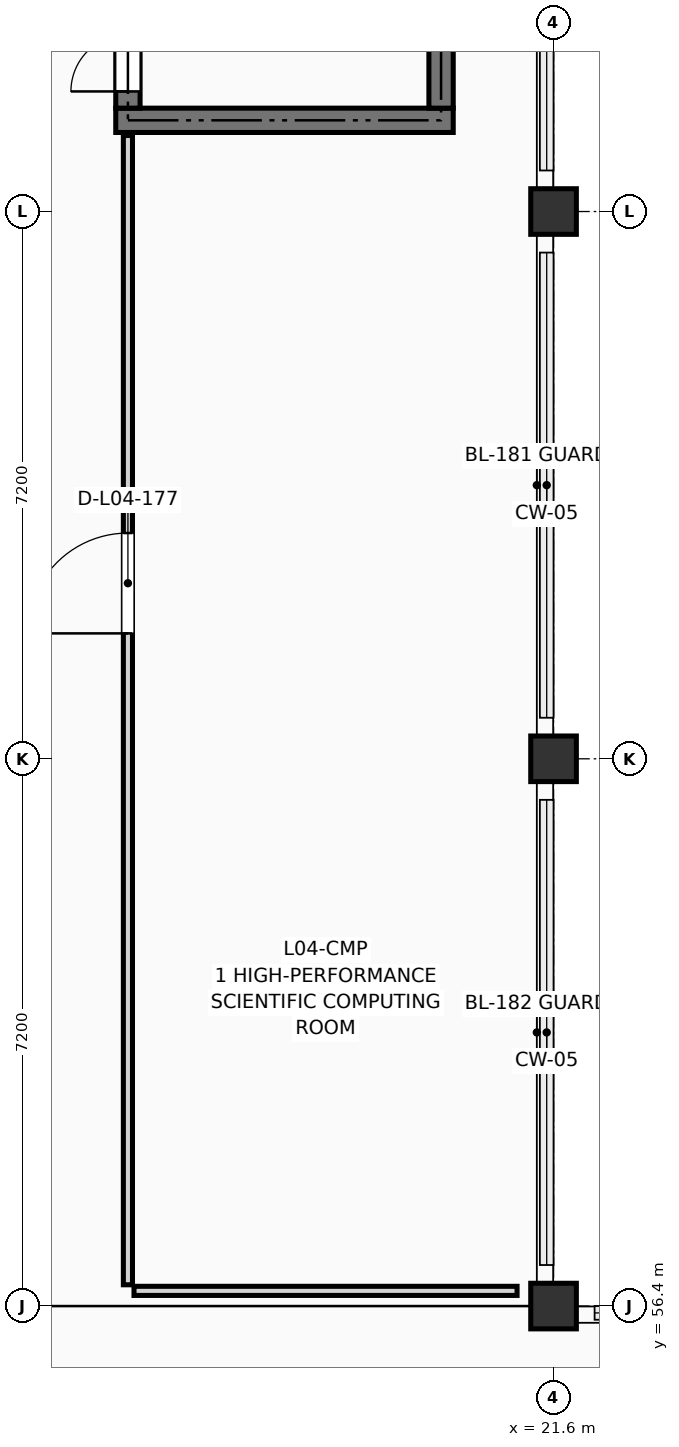
"""IFC4 building model, lengths in metres.
Left out: names, types, materials, properties, quantities, classifications, styles, units other than length and angle.
Written with IfcOpenShell. Run it as: python <this file> out.ifc"""

import sys

from ifc_helpers import new_model, si_unit, direction, frame, frame_2d, origin, origin_2d, place, context, subcontext, project, spatial, rectangle, extrude, element, fill, save


model = new_model("IFC4")
c1 = context("Model", 3, precision=1e-05, world=origin(), true_north=direction((0.0, 1.0)))
c2 = subcontext(c1, "Body", "Model", "MODEL_VIEW")
j1 = project(units=[si_unit("LENGTHUNIT", "METRE"), si_unit("PLANEANGLEUNIT", "RADIAN")], contexts=[c1])
p1 = place(None, origin())
s1 = spatial("IfcSite", under=j1, at=p1, CompositionType="ELEMENT")
p2 = place(p1, origin())
s2 = spatial("IfcBuilding", under=s1, at=p2, CompositionType="ELEMENT")
p3 = place(p2, frame((0.0, 0.0, 15.75)))
s3 = spatial("IfcBuildingStorey", under=s2, at=p3, CompositionType="ELEMENT", Elevation=15.75)
for number, where, z_axis, x_axis in (
    (1, (21.6, 56.4, 0.0), (0.0, 0.0, 1.0), (1.0, 0.0, 0.0)),
    (2, (21.6, 63.6, 0.0), (0.0, 0.0, 1.0), (1.0, 0.0, 0.0)),
    (3, (21.6, 70.8, 0.0), (0.0, 0.0, 1.0), (1.0, 0.0, 0.0)),
):
    element("IfcColumn", number, at=place(p3, frame(where, z_axis=z_axis, x_axis=x_axis)), inside=s3, PredefinedType="COLUMN", context=c2, shape_type="SweptSolid", body=[
        extrude(rectangle(XDim=0.6, YDim=0.6, at=origin_2d()), origin(), (0.0, 0.0, 1.0), 3.6),
    ])
p4 = place(p3, frame((15.84, 72.0, 0.0), z_axis=(0.0, 0.0, 1.0), x_axis=(1.0, 0.0, 0.0)))
e4 = element("IfcWall", 4, at=p4, inside=s3, PredefinedType="SHEAR", context=c2, shape_type="SweptSolid", body=[
    extrude(rectangle(XDim=4.44, YDim=0.32, at=frame_2d((2.22, 0.0))), origin(), (0.0, 0.0, 1.0), 3.39),
])
p5 = place(p3, frame((16.0, 72.16, 0.0), z_axis=(0.0, 0.0, 1.0), x_axis=(0.0, 1.0, 0.0)))
e5 = element("IfcWall", 5, at=p5, inside=s3, PredefinedType="SHEAR", context=c2, shape_type="SweptSolid", body=[
    extrude(rectangle(XDim=7.28, YDim=0.32, at=frame_2d((3.64, 0.0))), origin(), (0.0, 0.0, 1.0), 3.39),
])
p6 = place(p5, frame((0.22, 0.0, 0.0)))
e6 = element("IfcOpeningElement", 6, at=p6, cuts=e5, PredefinedType="OPENING", context=c2, shape_type="SweptSolid", body=[
    extrude(rectangle(XDim=1.5, YDim=2.2, at=frame_2d((0.75, 1.1))), frame((0.0, 0.172, 0.0), z_axis=(0.0, -1.0, 0.0), x_axis=(1.0, 0.0, 0.0)), (0.0, 0.0, 1.0), 0.344),
])
p7 = place(p3, frame((20.12, 72.16, 0.0), z_axis=(0.0, 0.0, 1.0), x_axis=(0.0, 1.0, 0.0)))
e7 = element("IfcWall", 7, at=p7, inside=s3, PredefinedType="SHEAR", context=c2, shape_type="SweptSolid", body=[
    extrude(rectangle(XDim=7.28, YDim=0.32, at=frame_2d((3.64, 0.0))), origin(), (0.0, 0.0, 1.0), 3.39),
])
p8 = place(p3, frame((16.0, 56.68, 0.0), z_axis=(0.0, 0.0, 1.0), x_axis=(0.0, 1.0, 0.0)))
e8 = element("IfcWall", 8, at=p8, inside=s3, PredefinedType="PARTITIONING", context=c2, shape_type="SweptSolid", body=[
    extrude(rectangle(XDim=15.12, YDim=0.12, at=frame_2d((7.56, 0.0))), origin(), (0.0, 0.0, 1.0), 3.375),
])
p9 = place(p8, frame((8.57, 0.0, 0.0)))
e9 = element("IfcOpeningElement", 9, at=p9, cuts=e8, PredefinedType="OPENING", context=c2, shape_type="SweptSolid", body=[
    extrude(rectangle(XDim=1.32, YDim=2.2, at=frame_2d((0.66, 1.1))), frame((0.0, 0.072, 0.0), z_axis=(0.0, -1.0, 0.0), x_axis=(1.0, 0.0, 0.0)), (0.0, 0.0, 1.0), 0.144),
])
p10 = place(p3, frame((16.08, 56.6, 0.0), z_axis=(0.0, 0.0, 1.0), x_axis=(1.0, 0.0, 0.0)))
e10 = element("IfcWall", 10, at=p10, inside=s3, PredefinedType="PARTITIONING", context=c2, shape_type="SweptSolid", body=[
    extrude(rectangle(XDim=5.04, YDim=0.12, at=frame_2d((2.52, 0.0))), origin(), (0.0, 0.0, 1.0), 2.691),
])
p11 = place(p6, origin())
e11 = element("IfcDoor", 11, at=p11, inside=s3, OperationType="DOUBLE_DOOR_SINGLE_SWING", PredefinedType="DOOR", context=c2, shape_type="SweptSolid", body=[
    extrude(rectangle(XDim=1.5, YDim=2.2, at=frame_2d((0.75, 1.1))), frame((0.0, 0.025, 0.0), z_axis=(0.0, -1.0, 0.0), x_axis=(1.0, 0.0, 0.0)), (0.0, 0.0, 1.0), 0.05),
])
fill(e6, e11)
p12 = place(p9, origin())
e12 = element("IfcDoor", 12, at=p12, inside=s3, OperationType="SINGLE_SWING_LEFT", PredefinedType="DOOR", context=c2, shape_type="SweptSolid", body=[
    extrude(rectangle(XDim=1.32, YDim=2.2, at=frame_2d((0.66, 1.1))), frame((0.0, 0.025, 0.0), z_axis=(0.0, -1.0, 0.0), x_axis=(1.0, 0.0, 0.0)), (0.0, 0.0, 1.0), 0.05),
])
fill(e9, e12)
save(model, sys.argv[1])
